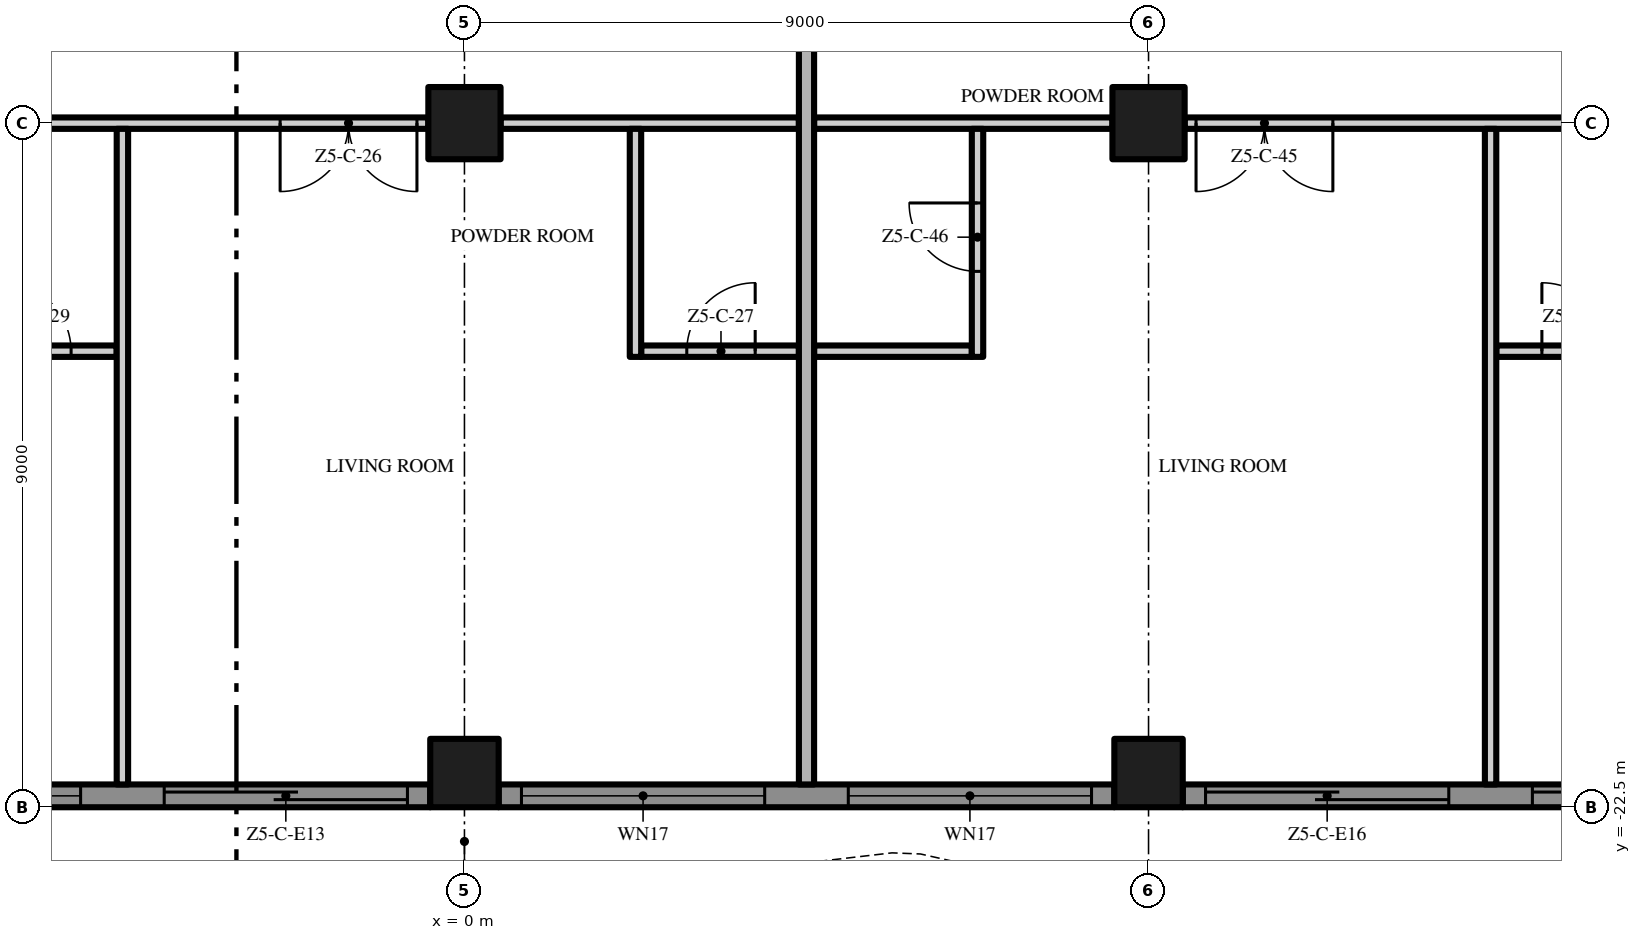
"""IFC4 building model, lengths in metres.
Left out: names, types, materials, properties, quantities, classifications, styles, units other than length and angle.
Written with IfcOpenShell. Run it as: python <this file> out.ifc"""

import sys

from ifc_helpers import new_model, si_unit, direction, frame, frame_2d, origin, origin_2d, place, context, subcontext, project, spatial, polyline, rectangle, outline, extrude, element, fill, save


model = new_model("IFC4")
c1 = context("Model", 3, precision=1e-05, world=origin(), true_north=direction((0.0, 1.0)))
c2 = subcontext(c1, "Body", "Model", "MODEL_VIEW")
j1 = project(units=[si_unit("LENGTHUNIT", "METRE"), si_unit("PLANEANGLEUNIT", "RADIAN")], contexts=[c1])
p1 = place(None, origin())
s1 = spatial("IfcSite", under=j1, at=p1, CompositionType="ELEMENT")
p2 = place(p1, origin())
s2 = spatial("IfcBuilding", under=s1, at=p2, CompositionType="ELEMENT")
p3 = place(p2, frame((0.0, 0.0, 269.2)))
s3 = spatial("IfcBuildingStorey", under=s2, at=p3, CompositionType="ELEMENT", Elevation=269.2)
p4 = place(p3, frame((0.0, -13.5, 0.0), z_axis=(0.0, 0.0, 1.0), x_axis=(1.0, 0.0, 0.0)))
e1 = element("IfcColumn", 1, at=p4, inside=s3, PredefinedType="COLUMN", context=c2, shape_type="SweptSolid", body=[
    extrude(rectangle(XDim=0.95, YDim=0.95, at=origin_2d()), origin(), (0.0, 0.0, 1.0), 3.5),
])
p5 = place(p3, frame((0.0, -22.05, 0.0), z_axis=(0.0, 0.0, 1.0), x_axis=(1.0, 0.0, 0.0)))
e2 = element("IfcColumn", 2, at=p5, inside=s3, PredefinedType="COLUMN", context=c2, shape_type="SweptSolid", body=[
    extrude(rectangle(XDim=0.9, YDim=0.9, at=origin_2d()), origin(), (0.0, 0.0, 1.0), 3.5),
])
p6 = place(p3, frame((9.0, -13.5, 0.0), z_axis=(0.0, 0.0, 1.0), x_axis=(1.0, 0.0, 0.0)))
e3 = element("IfcColumn", 3, at=p6, inside=s3, PredefinedType="COLUMN", context=c2, shape_type="SweptSolid", body=[
    extrude(rectangle(XDim=0.95, YDim=0.95, at=origin_2d()), origin(), (0.0, 0.0, 1.0), 3.5),
])
p7 = place(p3, frame((9.0, -22.05, 0.0), z_axis=(0.0, 0.0, 1.0), x_axis=(1.0, 0.0, 0.0)))
e4 = element("IfcColumn", 4, at=p7, inside=s3, PredefinedType="COLUMN", context=c2, shape_type="SweptSolid", body=[
    extrude(rectangle(XDim=0.9, YDim=0.9, at=origin_2d()), origin(), (0.0, 0.0, 1.0), 3.5),
])
p8 = place(p3, frame((-0.45, -22.35, 0.0), z_axis=(0.0, 0.0, 1.0), x_axis=(-1.0, 0.0, 0.0)))
e5 = element("IfcWall", 5, at=p8, inside=s3, PredefinedType="SOLIDWALL", context=c2, shape_type="SweptSolid", body=[
    extrude(rectangle(XDim=8.1, YDim=0.3, at=frame_2d((4.05, 0.0))), origin(), (0.0, 0.0, 1.0), 3.5),
])
p9 = place(p8, frame((4.6, 0.0, 0.45)))
e6 = element("IfcOpeningElement", 6, at=p9, cuts=e5, PredefinedType="OPENING", context=c2, shape_type="SweptSolid", body=[
    extrude(rectangle(XDim=3.2, YDim=2.65, at=frame_2d((1.6, 1.325))), frame((0.0, 0.16, 0.0), z_axis=(0.0, -1.0, 0.0), x_axis=(1.0, 0.0, 0.0)), (0.0, 0.0, 1.0), 0.32),
])
p10 = place(p8, frame((0.3, 0.0, 0.0)))
e7 = element("IfcOpeningElement", 7, at=p10, cuts=e5, PredefinedType="OPENING", context=c2, shape_type="SweptSolid", body=[
    extrude(rectangle(XDim=3.2, YDim=2.4, at=frame_2d((1.6, 1.2))), frame((0.0, 0.16, 0.0), z_axis=(0.0, -1.0, 0.0), x_axis=(1.0, 0.0, 0.0)), (0.0, 0.0, 1.0), 0.32),
])
p11 = place(p3, frame((8.55, -22.35, 0.0), z_axis=(0.0, 0.0, 1.0), x_axis=(-1.0, 0.0, 0.0)))
e8 = element("IfcWall", 8, at=p11, inside=s3, PredefinedType="SOLIDWALL", context=c2, shape_type="SweptSolid", body=[
    extrude(rectangle(XDim=8.1, YDim=0.3, at=frame_2d((4.05, 0.0))), origin(), (0.0, 0.0, 1.0), 3.5),
])
p12 = place(p11, frame((4.6, 0.0, 0.45)))
e9 = element("IfcOpeningElement", 9, at=p12, cuts=e8, PredefinedType="OPENING", context=c2, shape_type="SweptSolid", body=[
    extrude(rectangle(XDim=3.2, YDim=2.65, at=frame_2d((1.6, 1.325))), frame((0.0, 0.16, 0.0), z_axis=(0.0, -1.0, 0.0), x_axis=(1.0, 0.0, 0.0)), (0.0, 0.0, 1.0), 0.32),
])
p13 = place(p11, frame((0.3, 0.0, 0.45)))
e10 = element("IfcOpeningElement", 10, at=p13, cuts=e8, PredefinedType="OPENING", context=c2, shape_type="SweptSolid", body=[
    extrude(rectangle(XDim=3.2, YDim=2.65, at=frame_2d((1.6, 1.325))), frame((0.0, 0.16, 0.0), z_axis=(0.0, -1.0, 0.0), x_axis=(1.0, 0.0, 0.0)), (0.0, 0.0, 1.0), 0.32),
])
p14 = place(p3, frame((17.55, -22.35, 0.0), z_axis=(0.0, 0.0, 1.0), x_axis=(-1.0, 0.0, 0.0)))
e11 = element("IfcWall", 11, at=p14, inside=s3, PredefinedType="SOLIDWALL", context=c2, shape_type="SweptSolid", body=[
    extrude(rectangle(XDim=8.1, YDim=0.3, at=frame_2d((4.05, 0.0))), origin(), (0.0, 0.0, 1.0), 3.5),
])
p15 = place(p14, frame((4.6, 0.0, 0.0)))
e12 = element("IfcOpeningElement", 12, at=p15, cuts=e11, PredefinedType="OPENING", context=c2, shape_type="SweptSolid", body=[
    extrude(rectangle(XDim=3.2, YDim=2.4, at=frame_2d((1.6, 1.2))), frame((0.0, 0.16, 0.0), z_axis=(0.0, -1.0, 0.0), x_axis=(1.0, 0.0, 0.0)), (0.0, 0.0, 1.0), 0.32),
])
p16 = place(p14, frame((0.3, 0.0, 0.0)))
e13 = element("IfcOpeningElement", 13, at=p16, cuts=e11, PredefinedType="OPENING", context=c2, shape_type="SweptSolid", body=[
    extrude(rectangle(XDim=3.2, YDim=2.4, at=frame_2d((1.6, 1.2))), frame((0.0, 0.16, 0.0), z_axis=(0.0, -1.0, 0.0), x_axis=(1.0, 0.0, 0.0)), (0.0, 0.0, 1.0), 0.32),
])
p17 = place(p3, origin())
e14 = element("IfcWall", 14, at=p17, inside=s3, PredefinedType="USERDEFINED", context=c2, shape_type="SweptSolid", body=[
    extrude(outline(polyline([(-22.5, -23.451), (-21.0, -24.112), (-19.5, -24.845), (-18.0, -25.369), (-16.875, -25.5), (-16.5, -25.485), (-15.0, -25.149), (-13.5, -24.488), (-12.0, -23.755), (-10.5, -23.231), (-9.375, -23.1), (-9.0, -23.115), (-7.5, -23.451), (-6.0, -24.112), (-4.5, -24.845), (-3.0, -25.369), (-1.875, -25.5), (-1.5, -25.485), (0.0, -25.149), (1.5, -24.488), (3.0, -23.755), (4.5, -23.231), (5.625, -23.1), (6.0, -23.115), (7.5, -23.451), (9.0, -24.112), (10.5, -24.845), (12.0, -25.369), (13.125, -25.5), (13.5, -25.485), (15.0, -25.149), (16.5, -24.488), (18.0, -23.755), (19.5, -23.231), (20.625, -23.1), (21.0, -23.115), (22.5, -23.451), (22.555, -23.208), (21.033, -22.866), (20.615, -22.849), (19.444, -22.986), (17.904, -23.524), (16.395, -24.261), (14.921, -24.91), (13.467, -25.236), (13.135, -25.249), (12.056, -25.124), (10.596, -24.614), (9.105, -23.885), (7.579, -23.213), (6.033, -22.866), (5.615, -22.849), (4.444, -22.986), (2.904, -23.524), (1.395, -24.261), (-0.079, -24.91), (-1.533, -25.236), (-1.865, -25.249), (-2.944, -25.124), (-4.404, -24.614), (-5.895, -23.885), (-7.421, -23.213), (-8.967, -22.866), (-9.385, -22.849), (-10.556, -22.986), (-12.096, -23.524), (-13.605, -24.261), (-15.079, -24.91), (-16.533, -25.236), (-16.865, -25.249), (-17.944, -25.124), (-19.404, -24.614), (-20.895, -23.885), (-22.399, -23.223), (-22.5, -23.451)])), origin(), (0.0, 0.0, 1.0), 0.9),
])
p18 = place(p3, frame((-6.675, -16.5, 0.0), z_axis=(0.0, 0.0, 1.0), x_axis=(1.0, 0.0, 0.0)))
e15 = element("IfcWall", 15, at=p18, inside=s3, PredefinedType="PARTITIONING", context=c2, shape_type="SweptSolid", body=[
    extrude(rectangle(XDim=2.1, YDim=0.15, at=frame_2d((1.05, 0.0))), origin(), (0.0, 0.0, 1.0), 3.5),
])
p19 = place(p18, frame((0.6, 0.0, 0.0)))
e16 = element("IfcOpeningElement", 16, at=p19, cuts=e15, PredefinedType="OPENING", context=c2, shape_type="SweptSolid", body=[
    extrude(rectangle(XDim=0.9, YDim=2.1, at=frame_2d((0.45, 1.05))), frame((0.0, 0.085, 0.0), z_axis=(0.0, -1.0, 0.0), x_axis=(1.0, 0.0, 0.0)), (0.0, 0.0, 1.0), 0.17),
])
p20 = place(p3, frame((2.325, -16.5, 0.0), z_axis=(0.0, 0.0, 1.0), x_axis=(1.0, 0.0, 0.0)))
e17 = element("IfcWall", 17, at=p20, inside=s3, PredefinedType="PARTITIONING", context=c2, shape_type="SweptSolid", body=[
    extrude(rectangle(XDim=2.075, YDim=0.15, at=frame_2d((1.038, 0.0))), origin(), (0.0, 0.0, 1.0), 3.5),
])
p21 = place(p20, frame((0.6, 0.0, 0.0)))
e18 = element("IfcOpeningElement", 18, at=p21, cuts=e17, PredefinedType="OPENING", context=c2, shape_type="SweptSolid", body=[
    extrude(rectangle(XDim=0.9, YDim=2.1, at=frame_2d((0.45, 1.05))), frame((0.0, 0.085, 0.0), z_axis=(0.0, -1.0, 0.0), x_axis=(1.0, 0.0, 0.0)), (0.0, 0.0, 1.0), 0.17),
])
p22 = place(p3, frame((4.6, -16.5, 0.0), z_axis=(0.0, 0.0, 1.0), x_axis=(1.0, 0.0, 0.0)))
e19 = element("IfcWall", 19, at=p22, inside=s3, PredefinedType="PARTITIONING", context=c2, shape_type="SweptSolid", body=[
    extrude(rectangle(XDim=2.075, YDim=0.15, at=frame_2d((1.038, 0.0))), origin(), (0.0, 0.0, 1.0), 3.5),
])
p23 = place(p3, frame((13.575, -16.5, 0.0), z_axis=(0.0, 0.0, 1.0), x_axis=(1.0, 0.0, 0.0)))
e20 = element("IfcWall", 20, at=p23, inside=s3, PredefinedType="PARTITIONING", context=c2, shape_type="SweptSolid", body=[
    extrude(rectangle(XDim=2.1, YDim=0.15, at=frame_2d((1.05, 0.0))), origin(), (0.0, 0.0, 1.0), 3.5),
])
p24 = place(p23, frame((0.6, 0.0, 0.0)))
e21 = element("IfcOpeningElement", 21, at=p24, cuts=e20, PredefinedType="OPENING", context=c2, shape_type="SweptSolid", body=[
    extrude(rectangle(XDim=0.9, YDim=2.1, at=frame_2d((0.45, 1.05))), frame((0.0, 0.085, 0.0), z_axis=(0.0, -1.0, 0.0), x_axis=(1.0, 0.0, 0.0)), (0.0, 0.0, 1.0), 0.17),
])
p25 = place(p3, frame((-0.475, -13.5, 0.0), z_axis=(0.0, 0.0, 1.0), x_axis=(-1.0, 0.0, 0.0)))
e22 = element("IfcWall", 22, at=p25, inside=s3, PredefinedType="PARTITIONING", context=c2, shape_type="SweptSolid", body=[
    extrude(rectangle(XDim=8.05, YDim=0.15, at=frame_2d((4.025, 0.0))), origin(), (0.0, 0.0, 1.0), 3.5),
])
p26 = place(p25, frame((0.15, 0.0, 0.0)))
e23 = element("IfcOpeningElement", 23, at=p26, cuts=e22, PredefinedType="OPENING", context=c2, shape_type="SweptSolid", body=[
    extrude(rectangle(XDim=1.8, YDim=2.4, at=frame_2d((0.9, 1.2))), frame((0.0, 0.085, 0.0), z_axis=(0.0, -1.0, 0.0), x_axis=(1.0, 0.0, 0.0)), (0.0, 0.0, 1.0), 0.17),
])
p27 = place(p25, frame((6.9, 0.0, 0.0)))
e24 = element("IfcOpeningElement", 24, at=p27, cuts=e22, PredefinedType="OPENING", context=c2, shape_type="SweptSolid", body=[
    extrude(rectangle(XDim=1.0, YDim=2.4, at=frame_2d((0.5, 1.2))), frame((0.0, 0.085, 0.0), z_axis=(0.0, -1.0, 0.0), x_axis=(1.0, 0.0, 0.0)), (0.0, 0.0, 1.0), 0.17),
])
for number, where, z_axis, x_axis in (
    (25, (0.475, -13.5, 0.0), (0.0, 0.0, 1.0), (1.0, 0.0, 0.0)),
    (26, (4.6, -13.5, 0.0), (0.0, 0.0, 1.0), (1.0, 0.0, 0.0)),
):
    element("IfcWall", number, at=place(p3, frame(where, z_axis=z_axis, x_axis=x_axis)), inside=s3, PredefinedType="PARTITIONING", context=c2, shape_type="SweptSolid", body=[
        extrude(rectangle(XDim=3.925, YDim=0.15, at=frame_2d((1.962, 0.0))), origin(), (0.0, 0.0, 1.0), 3.5),
    ])
p28 = place(p3, frame((17.525, -13.5, 0.0), z_axis=(0.0, 0.0, 1.0), x_axis=(-1.0, 0.0, 0.0)))
e27 = element("IfcWall", 27, at=p28, inside=s3, PredefinedType="PARTITIONING", context=c2, shape_type="SweptSolid", body=[
    extrude(rectangle(XDim=8.05, YDim=0.15, at=frame_2d((4.025, 0.0))), origin(), (0.0, 0.0, 1.0), 3.5),
])
p29 = place(p28, frame((6.1, 0.0, 0.0)))
e28 = element("IfcOpeningElement", 28, at=p29, cuts=e27, PredefinedType="OPENING", context=c2, shape_type="SweptSolid", body=[
    extrude(rectangle(XDim=1.8, YDim=2.4, at=frame_2d((0.9, 1.2))), frame((0.0, 0.085, 0.0), z_axis=(0.0, -1.0, 0.0), x_axis=(1.0, 0.0, 0.0)), (0.0, 0.0, 1.0), 0.17),
])
p30 = place(p28, frame((0.15, 0.0, 0.0)))
e29 = element("IfcOpeningElement", 29, at=p30, cuts=e27, PredefinedType="OPENING", context=c2, shape_type="SweptSolid", body=[
    extrude(rectangle(XDim=1.0, YDim=2.4, at=frame_2d((0.5, 1.2))), frame((0.0, 0.085, 0.0), z_axis=(0.0, -1.0, 0.0), x_axis=(1.0, 0.0, 0.0)), (0.0, 0.0, 1.0), 0.17),
])
p31 = place(p3, frame((-4.5, -22.2, 0.0), z_axis=(0.0, 0.0, 1.0), x_axis=(0.0, 1.0, 0.0)))
e30 = element("IfcWall", 30, at=p31, inside=s3, PredefinedType="PARTITIONING", context=c2, shape_type="SweptSolid", body=[
    extrude(rectangle(XDim=8.625, YDim=0.15, at=frame_2d((4.312, 0.0))), origin(), (0.0, 0.0, 1.0), 3.5),
])
p32 = place(p3, frame((2.25, -16.575, 0.0), z_axis=(0.0, 0.0, 1.0), x_axis=(0.0, 1.0, 0.0)))
e31 = element("IfcWall", 31, at=p32, inside=s3, PredefinedType="PARTITIONING", context=c2, shape_type="SweptSolid", body=[
    extrude(rectangle(XDim=3.0, YDim=0.15, at=frame_2d((1.5, 0.0))), origin(), (0.0, 0.0, 1.0), 3.5),
])
p33 = place(p3, frame((4.5, -22.2, 0.0), z_axis=(0.0, 0.0, 1.0), x_axis=(0.0, 1.0, 0.0)))
e32 = element("IfcWall", 32, at=p33, inside=s3, PredefinedType="PARTITIONING", context=c2, shape_type="SweptSolid", body=[
    extrude(rectangle(XDim=22.1, YDim=0.2, at=frame_2d((11.05, 0.0))), origin(), (0.0, 0.0, 1.0), 3.5),
])
p34 = place(p3, frame((6.75, -16.575, 0.0), z_axis=(0.0, 0.0, 1.0), x_axis=(0.0, 1.0, 0.0)))
e33 = element("IfcWall", 33, at=p34, inside=s3, PredefinedType="PARTITIONING", context=c2, shape_type="SweptSolid", body=[
    extrude(rectangle(XDim=3.0, YDim=0.15, at=frame_2d((1.5, 0.0))), origin(), (0.0, 0.0, 1.0), 3.5),
])
p35 = place(p34, frame((1.125, 0.0, 0.0)))
e34 = element("IfcOpeningElement", 34, at=p35, cuts=e33, PredefinedType="OPENING", context=c2, shape_type="SweptSolid", body=[
    extrude(rectangle(XDim=0.9, YDim=2.1, at=frame_2d((0.45, 1.05))), frame((0.0, 0.085, 0.0), z_axis=(0.0, -1.0, 0.0), x_axis=(1.0, 0.0, 0.0)), (0.0, 0.0, 1.0), 0.17),
])
p36 = place(p3, frame((13.5, -22.2, 0.0), z_axis=(0.0, 0.0, 1.0), x_axis=(0.0, 1.0, 0.0)))
e35 = element("IfcWall", 35, at=p36, inside=s3, PredefinedType="PARTITIONING", context=c2, shape_type="SweptSolid", body=[
    extrude(rectangle(XDim=8.625, YDim=0.15, at=frame_2d((4.312, 0.0))), origin(), (0.0, 0.0, 1.0), 3.5),
])
p37 = place(p9, origin())
e36 = element("IfcWindow", 36, at=p37, inside=s3, PartitioningType="SINGLE_PANEL", PredefinedType="WINDOW", context=c2, shape_type="SweptSolid", body=[
    extrude(rectangle(XDim=3.2, YDim=2.65, at=frame_2d((1.6, 1.325))), frame((0.0, 0.03, 0.0), z_axis=(0.0, -1.0, 0.0), x_axis=(1.0, 0.0, 0.0)), (0.0, 0.0, 1.0), 0.06),
])
fill(e6, e36)
p38 = place(p10, origin())
e37 = element("IfcDoor", 37, at=p38, inside=s3, OperationType="SINGLE_SWING_LEFT", PredefinedType="DOOR", context=c2, shape_type="SweptSolid", body=[
    extrude(rectangle(XDim=3.2, YDim=2.4, at=frame_2d((1.6, 1.2))), frame((0.0, 0.025, 0.0), z_axis=(0.0, -1.0, 0.0), x_axis=(1.0, 0.0, 0.0)), (0.0, 0.0, 1.0), 0.05),
])
fill(e7, e37)
p39 = place(p12, origin())
e38 = element("IfcWindow", 38, at=p39, inside=s3, PartitioningType="SINGLE_PANEL", PredefinedType="WINDOW", context=c2, shape_type="SweptSolid", body=[
    extrude(rectangle(XDim=3.2, YDim=2.65, at=frame_2d((1.6, 1.325))), frame((0.0, 0.03, 0.0), z_axis=(0.0, -1.0, 0.0), x_axis=(1.0, 0.0, 0.0)), (0.0, 0.0, 1.0), 0.06),
])
fill(e9, e38)
p40 = place(p13, origin())
e39 = element("IfcWindow", 39, at=p40, inside=s3, PartitioningType="SINGLE_PANEL", PredefinedType="WINDOW", context=c2, shape_type="SweptSolid", body=[
    extrude(rectangle(XDim=3.2, YDim=2.65, at=frame_2d((1.6, 1.325))), frame((0.0, 0.03, 0.0), z_axis=(0.0, -1.0, 0.0), x_axis=(1.0, 0.0, 0.0)), (0.0, 0.0, 1.0), 0.06),
])
fill(e10, e39)
p41 = place(p15, origin())
e40 = element("IfcDoor", 40, at=p41, inside=s3, OperationType="SINGLE_SWING_LEFT", PredefinedType="DOOR", context=c2, shape_type="SweptSolid", body=[
    extrude(rectangle(XDim=3.2, YDim=2.4, at=frame_2d((1.6, 1.2))), frame((0.0, 0.025, 0.0), z_axis=(0.0, -1.0, 0.0), x_axis=(1.0, 0.0, 0.0)), (0.0, 0.0, 1.0), 0.05),
])
fill(e12, e40)
p42 = place(p16, origin())
e41 = element("IfcDoor", 41, at=p42, inside=s3, OperationType="SINGLE_SWING_LEFT", PredefinedType="DOOR", context=c2, shape_type="SweptSolid", body=[
    extrude(rectangle(XDim=3.2, YDim=2.4, at=frame_2d((1.6, 1.2))), frame((0.0, 0.025, 0.0), z_axis=(0.0, -1.0, 0.0), x_axis=(1.0, 0.0, 0.0)), (0.0, 0.0, 1.0), 0.05),
])
fill(e13, e41)
p43 = place(p26, origin())
e42 = element("IfcDoor", 42, at=p43, inside=s3, OperationType="DOUBLE_DOOR_SINGLE_SWING", PredefinedType="DOOR", context=c2, shape_type="SweptSolid", body=[
    extrude(rectangle(XDim=1.8, YDim=2.4, at=frame_2d((0.9, 1.2))), frame((0.0, 0.025, 0.0), z_axis=(0.0, -1.0, 0.0), x_axis=(1.0, 0.0, 0.0)), (0.0, 0.0, 1.0), 0.05),
])
fill(e23, e42)
p44 = place(p21, origin())
e43 = element("IfcDoor", 43, at=p44, inside=s3, OperationType="SINGLE_SWING_RIGHT", PredefinedType="DOOR", context=c2, shape_type="SweptSolid", body=[
    extrude(rectangle(XDim=0.9, YDim=2.1, at=frame_2d((0.45, 1.05))), frame((0.0, 0.025, 0.0), z_axis=(0.0, -1.0, 0.0), x_axis=(1.0, 0.0, 0.0)), (0.0, 0.0, 1.0), 0.05),
])
fill(e18, e43)
p45 = place(p19, origin())
e44 = element("IfcDoor", 44, at=p45, inside=s3, OperationType="SINGLE_SWING_LEFT", PredefinedType="DOOR", context=c2, shape_type="SweptSolid", body=[
    extrude(rectangle(XDim=0.9, YDim=2.1, at=frame_2d((0.45, 1.05))), frame((0.0, 0.025, 0.0), z_axis=(0.0, -1.0, 0.0), x_axis=(1.0, 0.0, 0.0)), (0.0, 0.0, 1.0), 0.05),
])
fill(e16, e44)
p46 = place(p29, origin())
e45 = element("IfcDoor", 45, at=p46, inside=s3, OperationType="DOUBLE_DOOR_SINGLE_SWING", PredefinedType="DOOR", context=c2, shape_type="SweptSolid", body=[
    extrude(rectangle(XDim=1.8, YDim=2.4, at=frame_2d((0.9, 1.2))), frame((0.0, 0.025, 0.0), z_axis=(0.0, -1.0, 0.0), x_axis=(1.0, 0.0, 0.0)), (0.0, 0.0, 1.0), 0.05),
])
fill(e28, e45)
p47 = place(p35, origin())
e46 = element("IfcDoor", 46, at=p47, inside=s3, OperationType="SINGLE_SWING_RIGHT", PredefinedType="DOOR", context=c2, shape_type="SweptSolid", body=[
    extrude(rectangle(XDim=0.9, YDim=2.1, at=frame_2d((0.45, 1.05))), frame((0.0, 0.025, 0.0), z_axis=(0.0, -1.0, 0.0), x_axis=(1.0, 0.0, 0.0)), (0.0, 0.0, 1.0), 0.05),
])
fill(e34, e46)
p48 = place(p24, origin())
e47 = element("IfcDoor", 47, at=p48, inside=s3, OperationType="SINGLE_SWING_LEFT", PredefinedType="DOOR", context=c2, shape_type="SweptSolid", body=[
    extrude(rectangle(XDim=0.9, YDim=2.1, at=frame_2d((0.45, 1.05))), frame((0.0, 0.025, 0.0), z_axis=(0.0, -1.0, 0.0), x_axis=(1.0, 0.0, 0.0)), (0.0, 0.0, 1.0), 0.05),
])
fill(e21, e47)
save(model, sys.argv[1])
